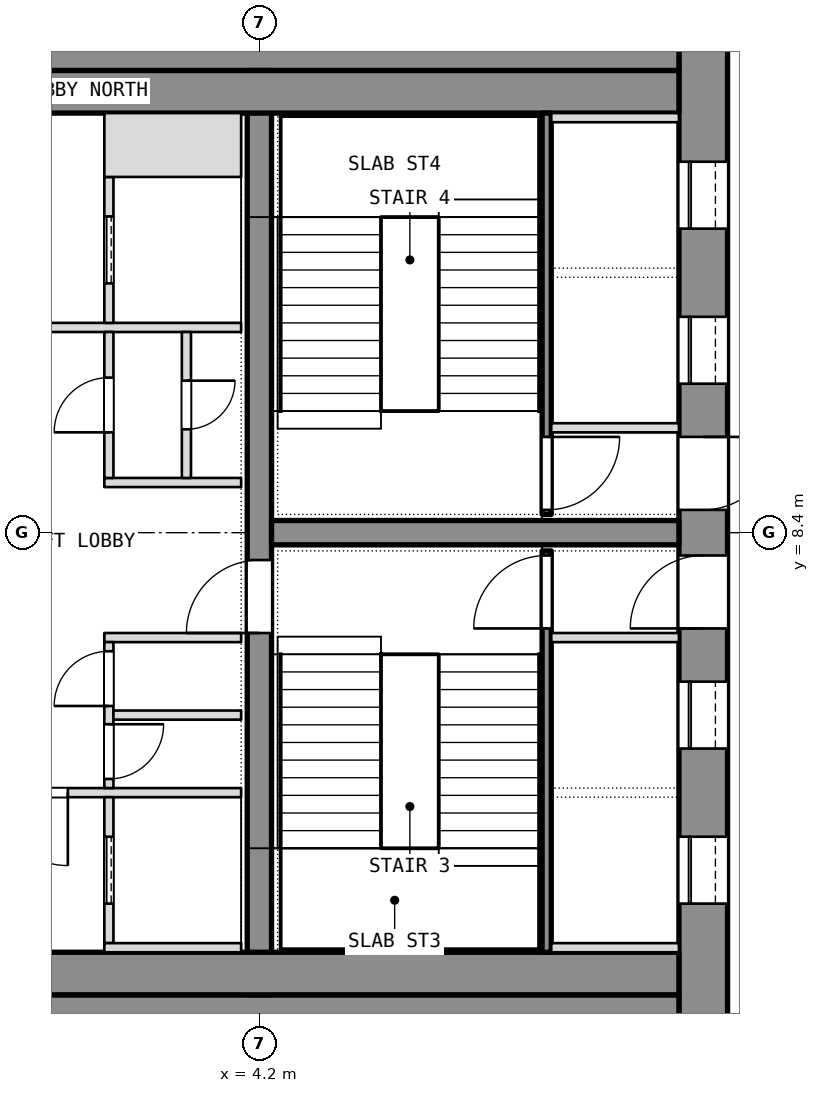
"""IFC4 building model, lengths in metres.
Left out: names, types, materials, properties, quantities, classifications, styles, units other than length and angle.
Written with IfcOpenShell. Run it as: python <this file> out.ifc"""

import sys

from ifc_helpers import new_model, si_unit, direction, frame, frame_2d, origin, place, context, subcontext, project, spatial, rectangle, extrude, element, fill, save


model = new_model("IFC4")
c1 = context("Model", 3, precision=1e-05, world=origin(), true_north=direction((0.0, 1.0)))
c2 = subcontext(c1, "Body", "Model", "MODEL_VIEW")
j1 = project(units=[si_unit("LENGTHUNIT", "METRE"), si_unit("PLANEANGLEUNIT", "RADIAN")], contexts=[c1])
p1 = place(None, origin())
s1 = spatial("IfcSite", under=j1, at=p1, CompositionType="ELEMENT")
p2 = place(p1, origin())
s2 = spatial("IfcBuilding", under=s1, at=p2, CompositionType="ELEMENT")
p3 = place(p2, frame((0.0, 0.0, 245.3)))
s3 = spatial("IfcBuildingStorey", under=s2, at=p3, CompositionType="ELEMENT", Elevation=245.3)
p4 = place(p3, frame((11.5, 0.0, 0.0), z_axis=(0.0, 0.0, 1.0), x_axis=(0.0, 1.0, 0.0)))
e1 = element("IfcWall", 1, at=p4, inside=s3, PredefinedType="SHEAR", context=c2, shape_type="SweptSolid", body=[
    extrude(rectangle(XDim=16.8, YDim=0.8, at=frame_2d((8.4, 0.0))), origin(), (0.0, 0.0, 1.0), 3.6),
])
p5 = place(p4, frame((2.3, 0.0, 0.0)))
e2 = element("IfcOpeningElement", 2, at=p5, cuts=e1, PredefinedType="OPENING", context=c2, shape_type="SweptSolid", body=[
    extrude(rectangle(XDim=1.1, YDim=2.1, at=frame_2d((0.55, 1.05))), frame((0.0, 0.4, 0.0), z_axis=(0.0, -1.0, 0.0), x_axis=(1.0, 0.0, 0.0)), (0.0, 0.0, 1.0), 0.8),
])
p6 = place(p4, frame((4.85, 0.0, 0.0)))
e3 = element("IfcOpeningElement", 3, at=p6, cuts=e1, PredefinedType="OPENING", context=c2, shape_type="SweptSolid", body=[
    extrude(rectangle(XDim=1.1, YDim=2.1, at=frame_2d((0.55, 1.05))), frame((0.0, 0.4, 0.0), z_axis=(0.0, -1.0, 0.0), x_axis=(1.0, 0.0, 0.0)), (0.0, 0.0, 1.0), 0.8),
])
p7 = place(p4, frame((6.825, 0.0, 0.0)))
e4 = element("IfcOpeningElement", 4, at=p7, cuts=e1, PredefinedType="OPENING", context=c2, shape_type="SweptSolid", body=[
    extrude(rectangle(XDim=1.2, YDim=2.1, at=frame_2d((0.6, 1.05))), frame((0.0, 0.4, 0.0), z_axis=(0.0, -1.0, 0.0), x_axis=(1.0, 0.0, 0.0)), (0.0, 0.0, 1.0), 0.8),
])
p8 = place(p4, frame((13.4, 0.0, 0.0)))
e5 = element("IfcOpeningElement", 5, at=p8, cuts=e1, PredefinedType="OPENING", context=c2, shape_type="SweptSolid", body=[
    extrude(rectangle(XDim=1.1, YDim=2.1, at=frame_2d((0.55, 1.05))), frame((0.0, 0.4, 0.0), z_axis=(0.0, -1.0, 0.0), x_axis=(1.0, 0.0, 0.0)), (0.0, 0.0, 1.0), 0.8),
])
p9 = place(p4, frame((10.85, 0.0, 0.0)))
e6 = element("IfcOpeningElement", 6, at=p9, cuts=e1, PredefinedType="OPENING", context=c2, shape_type="SweptSolid", body=[
    extrude(rectangle(XDim=1.1, YDim=2.1, at=frame_2d((0.55, 1.05))), frame((0.0, 0.4, 0.0), z_axis=(0.0, -1.0, 0.0), x_axis=(1.0, 0.0, 0.0)), (0.0, 0.0, 1.0), 0.8),
])
p10 = place(p4, frame((8.775, 0.0, 0.0)))
e7 = element("IfcOpeningElement", 7, at=p10, cuts=e1, PredefinedType="OPENING", context=c2, shape_type="SweptSolid", body=[
    extrude(rectangle(XDim=1.2, YDim=2.1, at=frame_2d((0.6, 1.05))), frame((0.0, 0.4, 0.0), z_axis=(0.0, -1.0, 0.0), x_axis=(1.0, 0.0, 0.0)), (0.0, 0.0, 1.0), 0.8),
])
for number, where, z_axis, x_axis in (
    (8, (-11.1, 0.4, 0.0), (0.0, 0.0, 1.0), (1.0, 0.0, 0.0)),
    (9, (-11.1, 16.4, 0.0), (0.0, 0.0, 1.0), (1.0, 0.0, 0.0)),
):
    element("IfcWall", number, at=place(p3, frame(where, z_axis=z_axis, x_axis=x_axis)), inside=s3, PredefinedType="SHEAR", context=c2, shape_type="SweptSolid", body=[
        extrude(rectangle(XDim=22.2, YDim=0.8, at=frame_2d((11.1, 0.0))), origin(), (0.0, 0.0, 1.0), 3.6),
    ])
p11 = place(p3, frame((4.2, 0.8, 0.0), z_axis=(0.0, 0.0, 1.0), x_axis=(0.0, 1.0, 0.0)))
e10 = element("IfcWall", 10, at=p11, inside=s3, PredefinedType="SHEAR", context=c2, shape_type="SweptSolid", body=[
    extrude(rectangle(XDim=15.2, YDim=0.4, at=frame_2d((7.6, 0.0))), origin(), (0.0, 0.0, 1.0), 3.6),
])
p12 = place(p11, frame((5.95, 0.0, 0.0)))
e11 = element("IfcOpeningElement", 11, at=p12, cuts=e10, PredefinedType="OPENING", context=c2, shape_type="SweptSolid", body=[
    extrude(rectangle(XDim=1.2, YDim=2.1, at=frame_2d((0.6, 1.05))), frame((0.0, 0.2, 0.0), z_axis=(0.0, -1.0, 0.0), x_axis=(1.0, 0.0, 0.0)), (0.0, 0.0, 1.0), 0.4),
])
p13 = place(p3, frame((4.4, 8.4, 0.0), z_axis=(0.0, 0.0, 1.0), x_axis=(1.0, 0.0, 0.0)))
e12 = element("IfcWall", 12, at=p13, inside=s3, PredefinedType="SHEAR", context=c2, shape_type="SweptSolid", body=[
    extrude(rectangle(XDim=6.7, YDim=0.4, at=frame_2d((3.35, 0.0))), origin(), (0.0, 0.0, 1.0), 3.6),
])
for number, where, z_axis, x_axis in (
    (13, (-11.1, 1.15, 0.0), (0.0, 0.0, 1.0), (1.0, 0.0, 0.0)),
    (14, (-11.1, 15.65, 0.0), (0.0, 0.0, 1.0), (1.0, 0.0, 0.0)),
):
    element("IfcWall", number, at=place(p3, frame(where, z_axis=z_axis, x_axis=x_axis)), inside=s3, PredefinedType="PARTITIONING", context=c2, shape_type="SweptSolid", body=[
        extrude(rectangle(XDim=22.2, YDim=0.7, at=frame_2d((11.1, 0.0))), origin(), (0.0, 0.0, 1.0), 3.34),
    ])
p14 = place(p3, frame((8.925, 1.5, 0.0), z_axis=(0.0, 0.0, 1.0), x_axis=(0.0, 1.0, 0.0)))
e15 = element("IfcWall", 15, at=p14, inside=s3, PredefinedType="SHEAR", context=c2, shape_type="SweptSolid", body=[
    extrude(rectangle(XDim=6.6, YDim=0.15, at=frame_2d((3.3, 0.0))), origin(), (0.0, 0.0, 1.0), 3.34),
])
p15 = place(p14, frame((5.325, 0.0, 0.0)))
e16 = element("IfcOpeningElement", 16, at=p15, cuts=e15, PredefinedType="OPENING", context=c2, shape_type="SweptSolid", body=[
    extrude(rectangle(XDim=1.2, YDim=2.1, at=frame_2d((0.6, 1.05))), frame((0.0, 0.075, 0.0), z_axis=(0.0, -1.0, 0.0), x_axis=(1.0, 0.0, 0.0)), (0.0, 0.0, 1.0), 0.15),
])
for number, where, z_axis, x_axis in (
    (17, (9.0, 6.675, 0.0), (0.0, 0.0, 1.0), (1.0, 0.0, 0.0)),
    (18, (9.0, 1.575, 0.0), (0.0, 0.0, 1.0), (1.0, 0.0, 0.0)),
):
    element("IfcWall", number, at=place(p3, frame(where, z_axis=z_axis, x_axis=x_axis)), inside=s3, PredefinedType="SHEAR", context=c2, shape_type="SweptSolid", body=[
        extrude(rectangle(XDim=2.1, YDim=0.15, at=frame_2d((1.05, 0.0))), origin(), (0.0, 0.0, 1.0), 3.6),
    ])
p16 = place(p3, frame((8.925, 8.7, 0.0), z_axis=(0.0, 0.0, 1.0), x_axis=(0.0, 1.0, 0.0)))
e19 = element("IfcWall", 19, at=p16, inside=s3, PredefinedType="SHEAR", context=c2, shape_type="SweptSolid", body=[
    extrude(rectangle(XDim=6.6, YDim=0.15, at=frame_2d((3.3, 0.0))), origin(), (0.0, 0.0, 1.0), 3.34),
])
p17 = place(p16, frame((0.075, 0.0, 0.0)))
e20 = element("IfcOpeningElement", 20, at=p17, cuts=e19, PredefinedType="OPENING", context=c2, shape_type="SweptSolid", body=[
    extrude(rectangle(XDim=1.2, YDim=2.1, at=frame_2d((0.6, 1.05))), frame((0.0, 0.075, 0.0), z_axis=(0.0, -1.0, 0.0), x_axis=(1.0, 0.0, 0.0)), (0.0, 0.0, 1.0), 0.15),
])
for number, where, z_axis, x_axis in (
    (21, (9.0, 10.125, 0.0), (0.0, 0.0, 1.0), (1.0, 0.0, 0.0)),
    (22, (9.0, 15.225, 0.0), (0.0, 0.0, 1.0), (1.0, 0.0, 0.0)),
):
    element("IfcWall", number, at=place(p3, frame(where, z_axis=z_axis, x_axis=x_axis)), inside=s3, PredefinedType="SHEAR", context=c2, shape_type="SweptSolid", body=[
        extrude(rectangle(XDim=2.1, YDim=0.15, at=frame_2d((1.05, 0.0))), origin(), (0.0, 0.0, 1.0), 3.6),
    ])
p18 = place(p3, frame((-3.9, 4.125, 0.0), z_axis=(0.0, 0.0, 1.0), x_axis=(1.0, 0.0, 0.0)))
e23 = element("IfcWall", 23, at=p18, inside=s3, PredefinedType="PARTITIONING", context=c2, shape_type="SweptSolid", body=[
    extrude(rectangle(XDim=7.8, YDim=0.15, at=frame_2d((3.9, 0.0))), origin(), (0.0, 0.0, 1.0), 3.34),
])
p19 = place(p18, frame((3.75, 0.0, 0.0)))
e24 = element("IfcOpeningElement", 24, at=p19, cuts=e23, PredefinedType="OPENING", context=c2, shape_type="SweptSolid", body=[
    extrude(rectangle(XDim=1.2, YDim=2.1, at=frame_2d((0.6, 1.05))), frame((0.0, 0.075, 0.0), z_axis=(0.0, -1.0, 0.0), x_axis=(1.0, 0.0, 0.0)), (0.0, 0.0, 1.0), 0.15),
])
p20 = place(p3, frame((-3.9, 11.775, 0.0), z_axis=(0.0, 0.0, 1.0), x_axis=(1.0, 0.0, 0.0)))
e25 = element("IfcWall", 25, at=p20, inside=s3, PredefinedType="PARTITIONING", context=c2, shape_type="SweptSolid", body=[
    extrude(rectangle(XDim=7.8, YDim=0.15, at=frame_2d((3.9, 0.0))), origin(), (0.0, 0.0, 1.0), 3.34),
])
p21 = place(p20, frame((3.3, 0.0, 0.0)))
e26 = element("IfcOpeningElement", 26, at=p21, cuts=e25, PredefinedType="OPENING", context=c2, shape_type="SweptSolid", body=[
    extrude(rectangle(XDim=1.2, YDim=2.1, at=frame_2d((0.6, 1.05))), frame((0.0, 0.075, 0.0), z_axis=(0.0, -1.0, 0.0), x_axis=(1.0, 0.0, 0.0)), (0.0, 0.0, 1.0), 0.15),
])
p22 = place(p3, frame((1.725, 1.65, 0.0), z_axis=(0.0, 0.0, 1.0), x_axis=(0.0, 1.0, 0.0)))
e27 = element("IfcWall", 27, at=p22, inside=s3, PredefinedType="SHEAR", context=c2, shape_type="SweptSolid", body=[
    extrude(rectangle(XDim=2.4, YDim=0.15, at=frame_2d((1.2, 0.0))), origin(), (0.0, 0.0, 1.0), 3.6),
])
p23 = place(p22, frame((0.65, 0.0, 0.0)))
e28 = element("IfcOpeningElement", 28, at=p23, cuts=e27, PredefinedType="OPENING", context=c2, shape_type="SweptSolid", body=[
    extrude(rectangle(XDim=1.1, YDim=2.1, at=frame_2d((0.55, 1.05))), frame((0.0, 0.075, 0.0), z_axis=(0.0, -1.0, 0.0), x_axis=(1.0, 0.0, 0.0)), (0.0, 0.0, 1.0), 0.15),
])
p24 = place(p3, frame((1.65, 1.575, 0.0), z_axis=(0.0, 0.0, 1.0), x_axis=(1.0, 0.0, 0.0)))
e29 = element("IfcWall", 29, at=p24, inside=s3, PredefinedType="SHEAR", context=c2, shape_type="SweptSolid", body=[
    extrude(rectangle(XDim=2.25, YDim=0.15, at=frame_2d((1.125, 0.0))), origin(), (0.0, 0.0, 1.0), 3.6),
])
p25 = place(p3, frame((1.725, 11.85, 0.0), z_axis=(0.0, 0.0, 1.0), x_axis=(0.0, 1.0, 0.0)))
e30 = element("IfcWall", 30, at=p25, inside=s3, PredefinedType="SHEAR", context=c2, shape_type="SweptSolid", body=[
    extrude(rectangle(XDim=2.4, YDim=0.15, at=frame_2d((1.2, 0.0))), origin(), (0.0, 0.0, 1.0), 3.6),
])
p26 = place(p25, frame((0.65, 0.0, 0.0)))
e31 = element("IfcOpeningElement", 31, at=p26, cuts=e30, PredefinedType="OPENING", context=c2, shape_type="SweptSolid", body=[
    extrude(rectangle(XDim=1.1, YDim=2.1, at=frame_2d((0.55, 1.05))), frame((0.0, 0.075, 0.0), z_axis=(0.0, -1.0, 0.0), x_axis=(1.0, 0.0, 0.0)), (0.0, 0.0, 1.0), 0.15),
])
p27 = place(p3, frame((1.65, 14.775, 0.0), z_axis=(0.0, 0.0, 1.0), x_axis=(1.0, 0.0, 0.0)))
e32 = element("IfcWall", 32, at=p27, inside=s3, PredefinedType="SHEAR", context=c2, shape_type="SweptSolid", body=[
    extrude(rectangle(XDim=2.25, YDim=1.05, at=frame_2d((1.125, 0.0))), origin(), (0.0, 0.0, 1.0), 3.6),
])
for number, where, z_axis, x_axis in (
    (33, (1.65, 6.675, 0.0), (0.0, 0.0, 1.0), (1.0, 0.0, 0.0)),
    (34, (1.65, 9.225, 0.0), (0.0, 0.0, 1.0), (1.0, 0.0, 0.0)),
):
    element("IfcWall", number, at=place(p3, frame(where, z_axis=z_axis, x_axis=x_axis)), inside=s3, PredefinedType="PARTITIONING", context=c2, shape_type="SweptSolid", body=[
        extrude(rectangle(XDim=2.25, YDim=0.15, at=frame_2d((1.125, 0.0))), origin(), (0.0, 0.0, 1.0), 3.34),
    ])
p28 = place(p3, frame((1.725, 4.2, 0.0), z_axis=(0.0, 0.0, 1.0), x_axis=(0.0, 1.0, 0.0)))
e35 = element("IfcWall", 35, at=p28, inside=s3, PredefinedType="PARTITIONING", context=c2, shape_type="SweptSolid", body=[
    extrude(rectangle(XDim=2.4, YDim=0.15, at=frame_2d((1.2, 0.0))), origin(), (0.0, 0.0, 1.0), 3.34),
])
p29 = place(p28, frame((0.15, 0.0, 0.0)))
e36 = element("IfcOpeningElement", 36, at=p29, cuts=e35, PredefinedType="OPENING", context=c2, shape_type="SweptSolid", body=[
    extrude(rectangle(XDim=0.9, YDim=2.1, at=frame_2d((0.45, 1.05))), frame((0.0, 0.075, 0.0), z_axis=(0.0, -1.0, 0.0), x_axis=(1.0, 0.0, 0.0)), (0.0, 0.0, 1.0), 0.15),
])
p30 = place(p28, frame((1.35, 0.0, 0.0)))
e37 = element("IfcOpeningElement", 37, at=p30, cuts=e35, PredefinedType="OPENING", context=c2, shape_type="SweptSolid", body=[
    extrude(rectangle(XDim=0.9, YDim=2.1, at=frame_2d((0.45, 1.05))), frame((0.0, 0.075, 0.0), z_axis=(0.0, -1.0, 0.0), x_axis=(1.0, 0.0, 0.0)), (0.0, 0.0, 1.0), 0.15),
])
p31 = place(p3, frame((1.725, 9.3, 0.0), z_axis=(0.0, 0.0, 1.0), x_axis=(0.0, 1.0, 0.0)))
e38 = element("IfcWall", 38, at=p31, inside=s3, PredefinedType="PARTITIONING", context=c2, shape_type="SweptSolid", body=[
    extrude(rectangle(XDim=2.4, YDim=0.15, at=frame_2d((1.2, 0.0))), origin(), (0.0, 0.0, 1.0), 3.34),
])
p32 = place(p31, frame((0.75, 0.0, 0.0)))
e39 = element("IfcOpeningElement", 39, at=p32, cuts=e38, PredefinedType="OPENING", context=c2, shape_type="SweptSolid", body=[
    extrude(rectangle(XDim=0.9, YDim=2.1, at=frame_2d((0.45, 1.05))), frame((0.0, 0.075, 0.0), z_axis=(0.0, -1.0, 0.0), x_axis=(1.0, 0.0, 0.0)), (0.0, 0.0, 1.0), 0.15),
])
p33 = place(p3, frame((1.8, 5.4, 0.0), z_axis=(0.0, 0.0, 1.0), x_axis=(1.0, 0.0, 0.0)))
e40 = element("IfcWall", 40, at=p33, inside=s3, PredefinedType="PARTITIONING", context=c2, shape_type="SweptSolid", body=[
    extrude(rectangle(XDim=2.1, YDim=0.15, at=frame_2d((1.05, 0.0))), origin(), (0.0, 0.0, 1.0), 3.34),
])
p34 = place(p3, frame((3.0, 9.3, 0.0), z_axis=(0.0, 0.0, 1.0), x_axis=(0.0, 1.0, 0.0)))
e41 = element("IfcWall", 41, at=p34, inside=s3, PredefinedType="PARTITIONING", context=c2, shape_type="SweptSolid", body=[
    extrude(rectangle(XDim=2.4, YDim=0.15, at=frame_2d((1.2, 0.0))), origin(), (0.0, 0.0, 1.0), 3.34),
])
p35 = place(p34, frame((0.8, 0.0, 0.0)))
e42 = element("IfcOpeningElement", 42, at=p35, cuts=e41, PredefinedType="OPENING", context=c2, shape_type="SweptSolid", body=[
    extrude(rectangle(XDim=0.8, YDim=2.1, at=frame_2d((0.4, 1.05))), frame((0.0, 0.075, 0.0), z_axis=(0.0, -1.0, 0.0), x_axis=(1.0, 0.0, 0.0)), (0.0, 0.0, 1.0), 0.15),
])
p36 = place(p5, origin())
e43 = element("IfcDoor", 43, at=p36, inside=s3, OperationType="SLIDING_TO_LEFT", PredefinedType="DOOR", context=c2, shape_type="SweptSolid", body=[
    extrude(rectangle(XDim=1.1, YDim=2.1, at=frame_2d((0.55, 1.05))), frame((0.0, 0.025, 0.0), z_axis=(0.0, -1.0, 0.0), x_axis=(1.0, 0.0, 0.0)), (0.0, 0.0, 1.0), 0.05),
])
fill(e2, e43)
p37 = place(p6, origin())
e44 = element("IfcDoor", 44, at=p37, inside=s3, OperationType="SLIDING_TO_LEFT", PredefinedType="DOOR", context=c2, shape_type="SweptSolid", body=[
    extrude(rectangle(XDim=1.1, YDim=2.1, at=frame_2d((0.55, 1.05))), frame((0.0, 0.025, 0.0), z_axis=(0.0, -1.0, 0.0), x_axis=(1.0, 0.0, 0.0)), (0.0, 0.0, 1.0), 0.05),
])
fill(e3, e44)
p38 = place(p7, origin())
e45 = element("IfcDoor", 45, at=p38, inside=s3, OperationType="SINGLE_SWING_LEFT", PredefinedType="DOOR", context=c2, shape_type="SweptSolid", body=[
    extrude(rectangle(XDim=1.2, YDim=2.1, at=frame_2d((0.6, 1.05))), frame((0.0, 0.025, 0.0), z_axis=(0.0, -1.0, 0.0), x_axis=(1.0, 0.0, 0.0)), (0.0, 0.0, 1.0), 0.05),
])
fill(e4, e45)
p39 = place(p15, origin())
e46 = element("IfcDoor", 46, at=p39, inside=s3, OperationType="SINGLE_SWING_LEFT", PredefinedType="DOOR", context=c2, shape_type="SweptSolid", body=[
    extrude(rectangle(XDim=1.2, YDim=2.1, at=frame_2d((0.6, 1.05))), frame((0.0, 0.025, 0.0), z_axis=(0.0, -1.0, 0.0), x_axis=(1.0, 0.0, 0.0)), (0.0, 0.0, 1.0), 0.05),
])
fill(e16, e46)
p40 = place(p8, origin())
e47 = element("IfcDoor", 47, at=p40, inside=s3, OperationType="SLIDING_TO_LEFT", PredefinedType="DOOR", context=c2, shape_type="SweptSolid", body=[
    extrude(rectangle(XDim=1.1, YDim=2.1, at=frame_2d((0.55, 1.05))), frame((0.0, 0.025, 0.0), z_axis=(0.0, -1.0, 0.0), x_axis=(1.0, 0.0, 0.0)), (0.0, 0.0, 1.0), 0.05),
])
fill(e5, e47)
p41 = place(p9, origin())
e48 = element("IfcDoor", 48, at=p41, inside=s3, OperationType="SLIDING_TO_LEFT", PredefinedType="DOOR", context=c2, shape_type="SweptSolid", body=[
    extrude(rectangle(XDim=1.1, YDim=2.1, at=frame_2d((0.55, 1.05))), frame((0.0, 0.025, 0.0), z_axis=(0.0, -1.0, 0.0), x_axis=(1.0, 0.0, 0.0)), (0.0, 0.0, 1.0), 0.05),
])
fill(e6, e48)
p42 = place(p10, origin())
e49 = element("IfcDoor", 49, at=p42, inside=s3, OperationType="SINGLE_SWING_LEFT", PredefinedType="DOOR", context=c2, shape_type="SweptSolid", body=[
    extrude(rectangle(XDim=1.2, YDim=2.1, at=frame_2d((0.6, 1.05))), frame((0.0, 0.025, 0.0), z_axis=(0.0, -1.0, 0.0), x_axis=(1.0, 0.0, 0.0)), (0.0, 0.0, 1.0), 0.05),
])
fill(e7, e49)
p43 = place(p17, origin())
e50 = element("IfcDoor", 50, at=p43, inside=s3, OperationType="SINGLE_SWING_LEFT", PredefinedType="DOOR", context=c2, shape_type="SweptSolid", body=[
    extrude(rectangle(XDim=1.2, YDim=2.1, at=frame_2d((0.6, 1.05))), frame((0.0, 0.025, 0.0), z_axis=(0.0, -1.0, 0.0), x_axis=(1.0, 0.0, 0.0)), (0.0, 0.0, 1.0), 0.05),
])
fill(e20, e50)
p44 = place(p29, origin())
e51 = element("IfcDoor", 51, at=p44, inside=s3, OperationType="SINGLE_SWING_LEFT", PredefinedType="DOOR", context=c2, shape_type="SweptSolid", body=[
    extrude(rectangle(XDim=0.9, YDim=2.1, at=frame_2d((0.45, 1.05))), frame((0.0, 0.025, 0.0), z_axis=(0.0, -1.0, 0.0), x_axis=(1.0, 0.0, 0.0)), (0.0, 0.0, 1.0), 0.05),
])
fill(e36, e51)
p45 = place(p30, origin())
e52 = element("IfcDoor", 52, at=p45, inside=s3, OperationType="SINGLE_SWING_LEFT", PredefinedType="DOOR", context=c2, shape_type="SweptSolid", body=[
    extrude(rectangle(XDim=0.9, YDim=2.1, at=frame_2d((0.45, 1.05))), frame((0.0, 0.025, 0.0), z_axis=(0.0, -1.0, 0.0), x_axis=(1.0, 0.0, 0.0)), (0.0, 0.0, 1.0), 0.05),
])
fill(e37, e52)
p46 = place(p32, origin())
e53 = element("IfcDoor", 53, at=p46, inside=s3, OperationType="SINGLE_SWING_LEFT", PredefinedType="DOOR", context=c2, shape_type="SweptSolid", body=[
    extrude(rectangle(XDim=0.9, YDim=2.1, at=frame_2d((0.45, 1.05))), frame((0.0, 0.025, 0.0), z_axis=(0.0, -1.0, 0.0), x_axis=(1.0, 0.0, 0.0)), (0.0, 0.0, 1.0), 0.05),
])
fill(e39, e53)
p47 = place(p35, origin())
e54 = element("IfcDoor", 54, at=p47, inside=s3, OperationType="SINGLE_SWING_LEFT", PredefinedType="DOOR", context=c2, shape_type="SweptSolid", body=[
    extrude(rectangle(XDim=0.8, YDim=2.1, at=frame_2d((0.4, 1.05))), frame((0.0, 0.025, 0.0), z_axis=(0.0, -1.0, 0.0), x_axis=(1.0, 0.0, 0.0)), (0.0, 0.0, 1.0), 0.05),
])
fill(e42, e54)
p48 = place(p23, origin())
e55 = element("IfcDoor", 55, at=p48, inside=s3, OperationType="SLIDING_TO_LEFT", PredefinedType="DOOR", context=c2, shape_type="SweptSolid", body=[
    extrude(rectangle(XDim=1.1, YDim=2.1, at=frame_2d((0.55, 1.05))), frame((0.0, 0.025, 0.0), z_axis=(0.0, -1.0, 0.0), x_axis=(1.0, 0.0, 0.0)), (0.0, 0.0, 1.0), 0.05),
])
fill(e28, e55)
p49 = place(p26, origin())
e56 = element("IfcDoor", 56, at=p49, inside=s3, OperationType="SLIDING_TO_LEFT", PredefinedType="DOOR", context=c2, shape_type="SweptSolid", body=[
    extrude(rectangle(XDim=1.1, YDim=2.1, at=frame_2d((0.55, 1.05))), frame((0.0, 0.025, 0.0), z_axis=(0.0, -1.0, 0.0), x_axis=(1.0, 0.0, 0.0)), (0.0, 0.0, 1.0), 0.05),
])
fill(e31, e56)
p50 = place(p19, origin())
e57 = element("IfcDoor", 57, at=p50, inside=s3, OperationType="SINGLE_SWING_LEFT", PredefinedType="DOOR", context=c2, shape_type="SweptSolid", body=[
    extrude(rectangle(XDim=1.2, YDim=2.1, at=frame_2d((0.6, 1.05))), frame((0.0, 0.025, 0.0), z_axis=(0.0, -1.0, 0.0), x_axis=(1.0, 0.0, 0.0)), (0.0, 0.0, 1.0), 0.05),
])
fill(e24, e57)
p51 = place(p12, origin())
e58 = element("IfcDoor", 58, at=p51, inside=s3, OperationType="SINGLE_SWING_LEFT", PredefinedType="DOOR", context=c2, shape_type="SweptSolid", body=[
    extrude(rectangle(XDim=1.2, YDim=2.1, at=frame_2d((0.6, 1.05))), frame((0.0, 0.025, 0.0), z_axis=(0.0, -1.0, 0.0), x_axis=(1.0, 0.0, 0.0)), (0.0, 0.0, 1.0), 0.05),
])
fill(e11, e58)
save(model, sys.argv[1])
